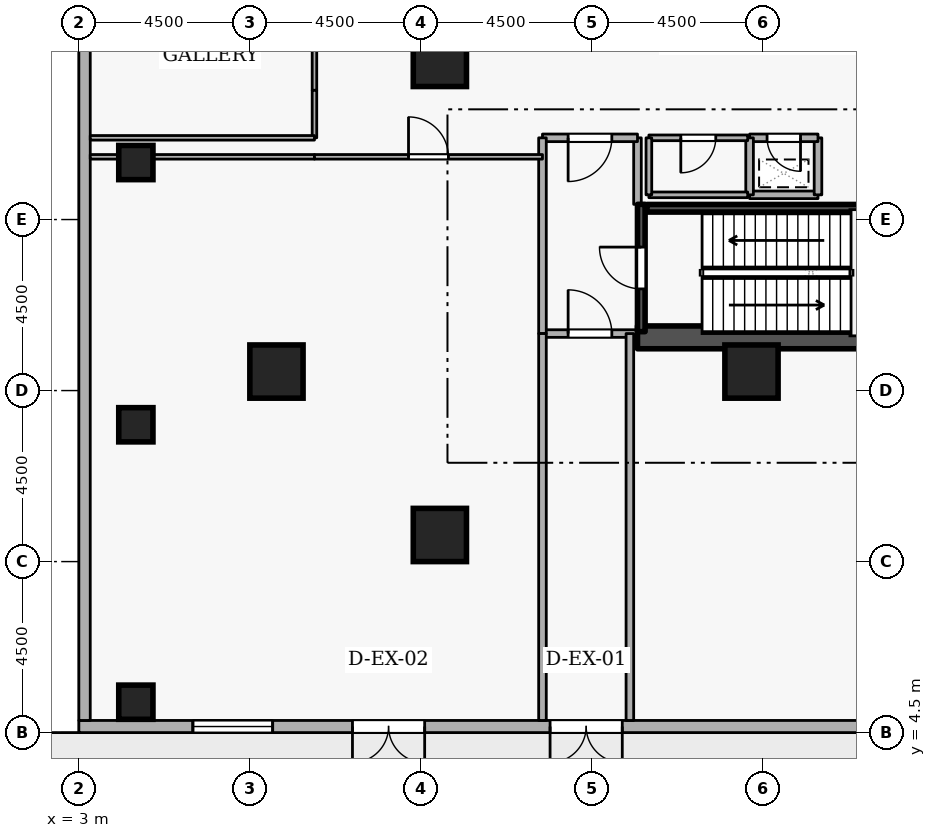
"""IFC4 building model, lengths in metres.
Left out: names, types, materials, properties, quantities, classifications, styles, units other than length and angle.
Written with IfcOpenShell. Run it as: python <this file> out.ifc"""

import sys

from ifc_helpers import new_model, si_unit, direction, frame, frame_2d, origin, origin_2d, place, context, subcontext, project, spatial, rectangle, extrude, element, fill, save


model = new_model("IFC4")
c1 = context("Model", 3, precision=1e-05, world=origin(), true_north=direction((0.0, 1.0)))
c2 = subcontext(c1, "Body", "Model", "MODEL_VIEW")
j1 = project(units=[si_unit("LENGTHUNIT", "METRE"), si_unit("PLANEANGLEUNIT", "RADIAN")], contexts=[c1])
p1 = place(None, origin())
s1 = spatial("IfcSite", under=j1, at=p1, CompositionType="ELEMENT")
p2 = place(p1, origin())
s2 = spatial("IfcBuilding", under=s1, at=p2, CompositionType="ELEMENT")
p3 = place(p2, origin())
s3 = spatial("IfcBuildingStorey", under=s2, at=p3, CompositionType="ELEMENT", Elevation=0.0)
p4 = place(p3, frame((17.7, 14.9, 0.0), z_axis=(0.0, 0.0, 1.0), x_axis=(1.0, 0.0, 0.0)))
e1 = element("IfcWall", 1, at=p4, inside=s3, PredefinedType="SHEAR", context=c2, shape_type="SweptSolid", body=[
    extrude(rectangle(XDim=15.6, YDim=0.6, at=frame_2d((7.8, 0.0))), origin(), (0.0, 0.0, 1.0), 4.8),
])
for number, where, z_axis, x_axis in (
    (2, (12.5, 9.7, 0.0), (0.0, 0.0, 1.0), (1.0, 0.0, 0.0)),
    (3, (8.2, 14.0, 0.0), (0.0, 0.0, 1.0), (1.0, 0.0, 0.0)),
    (4, (12.5, 22.2, 0.0), (0.0, 0.0, 1.0), (1.0, 0.0, 0.0)),
    (5, (20.7, 14.0, 0.0), (0.0, 0.0, 1.0), (1.0, 0.0, 0.0)),
):
    element("IfcColumn", number, at=place(p3, frame(where, z_axis=z_axis, x_axis=x_axis)), inside=s3, PredefinedType="COLUMN", context=c2, shape_type="SweptSolid", body=[
        extrude(rectangle(XDim=1.4, YDim=1.4, at=origin_2d()), origin(), (0.0, 0.0, 1.0), 4.8),
    ])
for number, where, z_axis, x_axis in (
    (6, (4.5, 5.3, 0.0), (0.0, 0.0, 1.0), (1.0, 0.0, 0.0)),
    (7, (4.5, 12.6, 0.0), (0.0, 0.0, 1.0), (1.0, 0.0, 0.0)),
    (8, (4.5, 19.5, 0.0), (0.0, 0.0, 1.0), (1.0, 0.0, 0.0)),
):
    element("IfcColumn", number, at=place(p3, frame(where, z_axis=z_axis, x_axis=x_axis)), inside=s3, PredefinedType="COLUMN", context=c2, shape_type="SweptSolid", body=[
        extrude(rectangle(XDim=0.9, YDim=0.9, at=origin_2d()), origin(), (0.0, 0.0, 1.0), 4.8),
    ])
p5 = place(p3, frame((3.0, 4.66, 0.0), z_axis=(0.0, 0.0, 1.0), x_axis=(1.0, 0.0, 0.0)))
e9 = element("IfcWall", 9, at=p5, inside=s3, PredefinedType="STANDARD", context=c2, shape_type="SweptSolid", body=[
    extrude(rectangle(XDim=39.4, YDim=0.32, at=frame_2d((19.7, 0.0))), origin(), (0.0, 0.0, 1.0), 3.86),
])
p6 = place(p5, frame((14.3, 0.0, 0.0), z_axis=(0.0, 0.0, 1.0), x_axis=(-1.0, 0.0, 0.0)))
e10 = element("IfcOpeningElement", 10, at=p6, cuts=e9, PredefinedType="OPENING", context=c2, shape_type="SweptSolid", body=[
    extrude(rectangle(XDim=1.9, YDim=2.25, at=frame_2d((0.95, 1.125))), frame((0.0, 0.17, 0.0), z_axis=(0.0, -1.0, 0.0), x_axis=(1.0, 0.0, 0.0)), (0.0, 0.0, 1.0), 0.34),
])
p7 = place(p5, frame((9.1, 0.0, 0.0), z_axis=(0.0, 0.0, 1.0), x_axis=(-1.0, 0.0, 0.0)))
e11 = element("IfcOpeningElement", 11, at=p7, cuts=e9, PredefinedType="OPENING", context=c2, shape_type="SweptSolid", body=[
    extrude(rectangle(XDim=1.9, YDim=2.25, at=frame_2d((0.95, 1.125))), frame((0.0, 0.17, 0.0), z_axis=(0.0, -1.0, 0.0), x_axis=(1.0, 0.0, 0.0)), (0.0, 0.0, 1.0), 0.34),
])
p8 = place(p5, frame((35.1, 0.0, 0.0), z_axis=(0.0, 0.0, 1.0), x_axis=(-1.0, 0.0, 0.0)))
e12 = element("IfcOpeningElement", 12, at=p8, cuts=e9, PredefinedType="OPENING", context=c2, shape_type="SweptSolid", body=[
    extrude(rectangle(XDim=1.9, YDim=2.25, at=frame_2d((0.95, 1.125))), frame((0.0, 0.17, 0.0), z_axis=(0.0, -1.0, 0.0), x_axis=(1.0, 0.0, 0.0)), (0.0, 0.0, 1.0), 0.34),
])
p9 = place(p5, frame((3.0, 0.0, 0.78)))
e13 = element("IfcOpeningElement", 13, at=p9, cuts=e9, PredefinedType="OPENING", context=c2, shape_type="SweptSolid", body=[
    extrude(rectangle(XDim=2.1, YDim=2.4, at=frame_2d((1.05, 1.2))), frame((0.0, 0.17, 0.0), z_axis=(0.0, -1.0, 0.0), x_axis=(1.0, 0.0, 0.0)), (0.0, 0.0, 1.0), 0.34),
])
p10 = place(p5, frame((22.8, 0.0, 0.78)))
e14 = element("IfcOpeningElement", 14, at=p10, cuts=e9, PredefinedType="OPENING", context=c2, shape_type="SweptSolid", body=[
    extrude(rectangle(XDim=2.1, YDim=2.4, at=frame_2d((1.05, 1.2))), frame((0.0, 0.17, 0.0), z_axis=(0.0, -1.0, 0.0), x_axis=(1.0, 0.0, 0.0)), (0.0, 0.0, 1.0), 0.34),
])
p11 = place(p3, frame((3.15, 49.18, 0.0), z_axis=(0.0, 0.0, 1.0), x_axis=(0.0, -1.0, 0.0)))
e15 = element("IfcWall", 15, at=p11, inside=s3, PredefinedType="STANDARD", context=c2, shape_type="SweptSolid", body=[
    extrude(rectangle(XDim=44.36, YDim=0.3, at=frame_2d((22.18, 0.0))), origin(), (0.0, 0.0, 1.0), 3.86),
])
p12 = place(p11, frame((22.9, 0.0, 0.0), z_axis=(0.0, 0.0, 1.0), x_axis=(-1.0, 0.0, 0.0)))
e16 = element("IfcOpeningElement", 16, at=p12, cuts=e15, PredefinedType="OPENING", context=c2, shape_type="SweptSolid", body=[
    extrude(rectangle(XDim=1.9, YDim=2.25, at=frame_2d((0.95, 1.125))), frame((0.0, 0.16, 0.0), z_axis=(0.0, -1.0, 0.0), x_axis=(1.0, 0.0, 0.0)), (0.0, 0.0, 1.0), 0.32),
])
p13 = place(p3, frame((17.8, 15.05, 0.0), z_axis=(0.0, 0.0, 1.0), x_axis=(0.0, 1.0, 0.0)))
e17 = element("IfcWall", 17, at=p13, inside=s3, PredefinedType="SHEAR", context=c2, shape_type="SweptSolid", body=[
    extrude(rectangle(XDim=3.35, YDim=0.2, at=frame_2d((1.675, 0.0))), origin(), (0.0, 0.0, 1.0), 4.8),
])
p14 = place(p13, frame((1.125, 0.0, 0.0)))
e18 = element("IfcOpeningElement", 18, at=p14, cuts=e17, PredefinedType="OPENING", context=c2, shape_type="SweptSolid", body=[
    extrude(rectangle(XDim=1.1, YDim=2.1, at=frame_2d((0.55, 1.05))), frame((0.0, 0.11, 0.0), z_axis=(0.0, -1.0, 0.0), x_axis=(1.0, 0.0, 0.0)), (0.0, 0.0, 1.0), 0.22),
])
p15 = place(p3, frame((25.05, 18.297, 0.0), z_axis=(0.0, 0.0, 1.0), x_axis=(-1.0, 0.0, 0.0)))
e19 = element("IfcWall", 19, at=p15, inside=s3, PredefinedType="SHEAR", context=c2, shape_type="SweptSolid", body=[
    extrude(rectangle(XDim=7.1, YDim=0.2, at=frame_2d((3.55, 0.0))), origin(), (0.0, 0.0, 1.0), 4.8),
])
p16 = place(p3, frame((15.2, 15.0, 0.0), z_axis=(0.0, 0.0, 1.0), x_axis=(1.0, 0.0, 0.0)))
e20 = element("IfcWall", 20, at=p16, inside=s3, PredefinedType="STANDARD", context=c2, shape_type="SweptSolid", body=[
    extrude(rectangle(XDim=2.5, YDim=0.2, at=frame_2d((1.25, 0.0))), origin(), (0.0, 0.0, 1.0), 4.46),
])
p17 = place(p16, frame((0.675, 0.0, 0.0)))
e21 = element("IfcOpeningElement", 21, at=p17, cuts=e20, PredefinedType="OPENING", context=c2, shape_type="SweptSolid", body=[
    extrude(rectangle(XDim=1.15, YDim=2.1, at=frame_2d((0.575, 1.05))), frame((0.0, 0.11, 0.0), z_axis=(0.0, -1.0, 0.0), x_axis=(1.0, 0.0, 0.0)), (0.0, 0.0, 1.0), 0.22),
])
p18 = place(p3, frame((17.7, 18.4, 0.0), z_axis=(0.0, 0.0, 1.0), x_axis=(0.0, 1.0, 0.0)))
e22 = element("IfcWall", 22, at=p18, inside=s3, PredefinedType="STANDARD", context=c2, shape_type="SweptSolid", body=[
    extrude(rectangle(XDim=1.75, YDim=0.2, at=frame_2d((0.875, 0.0))), origin(), (0.0, 0.0, 1.0), 3.665),
])
p19 = place(p3, frame((17.7, 20.15, 0.0), z_axis=(0.0, 0.0, 1.0), x_axis=(-1.0, 0.0, 0.0)))
e23 = element("IfcWall", 23, at=p19, inside=s3, PredefinedType="STANDARD", context=c2, shape_type="SweptSolid", body=[
    extrude(rectangle(XDim=2.5, YDim=0.2, at=frame_2d((1.25, 0.0))), origin(), (0.0, 0.0, 1.0), 4.46),
])
p20 = place(p19, frame((0.675, 0.0, 0.0)))
e24 = element("IfcOpeningElement", 24, at=p20, cuts=e23, PredefinedType="OPENING", context=c2, shape_type="SweptSolid", body=[
    extrude(rectangle(XDim=1.15, YDim=2.1, at=frame_2d((0.575, 1.05))), frame((0.0, 0.11, 0.0), z_axis=(0.0, -1.0, 0.0), x_axis=(1.0, 0.0, 0.0)), (0.0, 0.0, 1.0), 0.22),
])
p21 = place(p3, frame((15.2, 20.15, 0.0), z_axis=(0.0, 0.0, 1.0), x_axis=(0.0, -1.0, 0.0)))
e25 = element("IfcWall", 25, at=p21, inside=s3, PredefinedType="STANDARD", context=c2, shape_type="SweptSolid", body=[
    extrude(rectangle(XDim=5.15, YDim=0.2, at=frame_2d((2.575, 0.0))), origin(), (0.0, 0.0, 1.0), 4.46),
])
p22 = place(p3, frame((20.65, 18.65, 0.0), z_axis=(0.0, 0.0, 1.0), x_axis=(1.0, 0.0, 0.0)))
e26 = element("IfcWall", 26, at=p22, inside=s3, PredefinedType="STANDARD", context=c2, shape_type="SweptSolid", body=[
    extrude(rectangle(XDim=1.8, YDim=0.2, at=frame_2d((0.9, 0.0))), origin(), (0.0, 0.0, 1.0), 4.46),
])
p23 = place(p3, frame((22.45, 18.65, 0.0), z_axis=(0.0, 0.0, 1.0), x_axis=(0.0, 1.0, 0.0)))
e27 = element("IfcWall", 27, at=p23, inside=s3, PredefinedType="STANDARD", context=c2, shape_type="SweptSolid", body=[
    extrude(rectangle(XDim=1.5, YDim=0.2, at=frame_2d((0.75, 0.0))), origin(), (0.0, 0.0, 1.0), 4.46),
])
p24 = place(p3, frame((22.45, 20.15, 0.0), z_axis=(0.0, 0.0, 1.0), x_axis=(-1.0, 0.0, 0.0)))
e28 = element("IfcWall", 28, at=p24, inside=s3, PredefinedType="STANDARD", context=c2, shape_type="SweptSolid", body=[
    extrude(rectangle(XDim=1.8, YDim=0.2, at=frame_2d((0.9, 0.0))), origin(), (0.0, 0.0, 1.0), 4.46),
])
p25 = place(p24, frame((0.46, 0.0, 0.0)))
e29 = element("IfcOpeningElement", 29, at=p25, cuts=e28, PredefinedType="OPENING", context=c2, shape_type="SweptSolid", body=[
    extrude(rectangle(XDim=0.88, YDim=2.04, at=frame_2d((0.44, 1.02))), frame((0.0, 0.11, 0.0), z_axis=(0.0, -1.0, 0.0), x_axis=(1.0, 0.0, 0.0)), (0.0, 0.0, 1.0), 0.22),
])
p26 = place(p3, frame((20.65, 20.15, 0.0), z_axis=(0.0, 0.0, 1.0), x_axis=(0.0, -1.0, 0.0)))
e30 = element("IfcWall", 30, at=p26, inside=s3, PredefinedType="STANDARD", context=c2, shape_type="SweptSolid", body=[
    extrude(rectangle(XDim=1.5, YDim=0.2, at=frame_2d((0.75, 0.0))), origin(), (0.0, 0.0, 1.0), 4.46),
])
for number, where, z_axis, x_axis in (
    (31, (15.2, 4.82, 0.0), (0.0, 0.0, 1.0), (0.0, 1.0, 0.0)),
    (32, (17.5, 15.0, 0.0), (0.0, 0.0, 1.0), (0.0, -1.0, 0.0)),
):
    element("IfcWall", number, at=place(p3, frame(where, z_axis=z_axis, x_axis=x_axis)), inside=s3, PredefinedType="STANDARD", context=c2, shape_type="SweptSolid", body=[
        extrude(rectangle(XDim=10.18, YDim=0.2, at=frame_2d((5.09, 0.0))), origin(), (0.0, 0.0, 1.0), 4.46),
    ])
p27 = place(p3, frame((18.0, 18.65, 0.0), z_axis=(0.0, 0.0, 1.0), x_axis=(1.0, 0.0, 0.0)))
e33 = element("IfcWall", 33, at=p27, inside=s3, PredefinedType="PARTITIONING", context=c2, shape_type="SweptSolid", body=[
    extrude(rectangle(XDim=2.6, YDim=0.15, at=frame_2d((1.3, 0.0))), origin(), (0.0, 0.0, 1.0), 4.46),
])
p28 = place(p3, frame((20.6, 20.15, 0.0), z_axis=(0.0, 0.0, 1.0), x_axis=(-1.0, 0.0, 0.0)))
e34 = element("IfcWall", 34, at=p28, inside=s3, PredefinedType="PARTITIONING", context=c2, shape_type="SweptSolid", body=[
    extrude(rectangle(XDim=2.6, YDim=0.15, at=frame_2d((1.3, 0.0))), origin(), (0.0, 0.0, 1.0), 4.46),
])
p29 = place(p28, frame((0.84, 0.0, 0.0)))
e35 = element("IfcOpeningElement", 35, at=p29, cuts=e34, PredefinedType="OPENING", context=c2, shape_type="SweptSolid", body=[
    extrude(rectangle(XDim=0.92, YDim=2.08, at=frame_2d((0.46, 1.04))), frame((0.0, 0.085, 0.0), z_axis=(0.0, -1.0, 0.0), x_axis=(1.0, 0.0, 0.0)), (0.0, 0.0, 1.0), 0.17),
])
p30 = place(p3, frame((18.0, 20.15, 0.0), z_axis=(0.0, 0.0, 1.0), x_axis=(0.0, -1.0, 0.0)))
e36 = element("IfcWall", 36, at=p30, inside=s3, PredefinedType="PARTITIONING", context=c2, shape_type="SweptSolid", body=[
    extrude(rectangle(XDim=1.5, YDim=0.15, at=frame_2d((0.75, 0.0))), origin(), (0.0, 0.0, 1.0), 3.665),
])
p31 = place(p3, frame((3.3, 19.65, 0.0), z_axis=(0.0, 0.0, 1.0), x_axis=(1.0, 0.0, 0.0)))
e37 = element("IfcWall", 37, at=p31, inside=s3, PredefinedType="PARTITIONING", context=c2, shape_type="SweptSolid", body=[
    extrude(rectangle(XDim=5.9, YDim=0.12, at=frame_2d((2.95, 0.0))), origin(), (0.0, 0.0, 1.0), 4.46),
])
p32 = place(p3, frame((9.2, 19.65, 0.0), z_axis=(0.0, 0.0, 1.0), x_axis=(1.0, 0.0, 0.0)))
e38 = element("IfcWall", 38, at=p32, inside=s3, PredefinedType="PARTITIONING", context=c2, shape_type="SweptSolid", body=[
    extrude(rectangle(XDim=6.0, YDim=0.12, at=frame_2d((3.0, 0.0))), origin(), (0.0, 0.0, 1.0), 4.46),
])
p33 = place(p32, frame((2.475, 0.0, 0.0)))
e39 = element("IfcOpeningElement", 39, at=p33, cuts=e38, PredefinedType="OPENING", context=c2, shape_type="SweptSolid", body=[
    extrude(rectangle(XDim=1.05, YDim=2.1, at=frame_2d((0.525, 1.05))), frame((0.0, 0.07, 0.0), z_axis=(0.0, -1.0, 0.0), x_axis=(1.0, 0.0, 0.0)), (0.0, 0.0, 1.0), 0.14),
])
p34 = place(p3, frame((9.2, 33.85, 0.0), z_axis=(0.0, 0.0, 1.0), x_axis=(0.0, -1.0, 0.0)))
e40 = element("IfcWall", 40, at=p34, inside=s3, PredefinedType="PARTITIONING", context=c2, shape_type="SweptSolid", body=[
    extrude(rectangle(XDim=12.45, YDim=0.12, at=frame_2d((6.225, 0.0))), origin(), (0.0, 0.0, 1.0), 4.46),
])
p35 = place(p34, frame((4.82, 0.0, 0.0)))
e41 = element("IfcOpeningElement", 41, at=p35, cuts=e40, PredefinedType="OPENING", context=c2, shape_type="SweptSolid", body=[
    extrude(rectangle(XDim=1.05, YDim=2.1, at=frame_2d((0.525, 1.05))), frame((0.0, 0.07, 0.0), z_axis=(0.0, -1.0, 0.0), x_axis=(1.0, 0.0, 0.0)), (0.0, 0.0, 1.0), 0.14),
])
p36 = place(p3, frame((9.2, 21.4, 0.0), z_axis=(0.0, 0.0, 1.0), x_axis=(0.0, -1.0, 0.0)))
e42 = element("IfcWall", 42, at=p36, inside=s3, PredefinedType="PARTITIONING", context=c2, shape_type="SweptSolid", body=[
    extrude(rectangle(XDim=1.25, YDim=0.12, at=frame_2d((0.625, 0.0))), origin(), (0.0, 0.0, 1.0), 4.46),
])
p37 = place(p3, frame((9.2, 20.15, 0.0), z_axis=(0.0, 0.0, 1.0), x_axis=(-1.0, 0.0, 0.0)))
e43 = element("IfcWall", 43, at=p37, inside=s3, PredefinedType="PARTITIONING", context=c2, shape_type="SweptSolid", body=[
    extrude(rectangle(XDim=5.9, YDim=0.12, at=frame_2d((2.95, 0.0))), origin(), (0.0, 0.0, 1.0), 4.46),
])
p38 = place(p6, origin())
e44 = element("IfcDoor", 44, at=p38, inside=s3, OperationType="DOUBLE_DOOR_SINGLE_SWING", PredefinedType="DOOR", context=c2, shape_type="SweptSolid", body=[
    extrude(rectangle(XDim=1.9, YDim=2.25, at=frame_2d((0.95, 1.125))), frame((0.0, 0.025, 0.0), z_axis=(0.0, -1.0, 0.0), x_axis=(1.0, 0.0, 0.0)), (0.0, 0.0, 1.0), 0.05),
])
fill(e10, e44)
p39 = place(p7, origin())
e45 = element("IfcDoor", 45, at=p39, inside=s3, OperationType="DOUBLE_DOOR_SINGLE_SWING", PredefinedType="DOOR", context=c2, shape_type="SweptSolid", body=[
    extrude(rectangle(XDim=1.9, YDim=2.25, at=frame_2d((0.95, 1.125))), frame((0.0, 0.025, 0.0), z_axis=(0.0, -1.0, 0.0), x_axis=(1.0, 0.0, 0.0)), (0.0, 0.0, 1.0), 0.05),
])
fill(e11, e45)
p40 = place(p9, origin())
e46 = element("IfcWindow", 46, at=p40, inside=s3, PartitioningType="SINGLE_PANEL", PredefinedType="WINDOW", context=c2, shape_type="SweptSolid", body=[
    extrude(rectangle(XDim=2.1, YDim=2.4, at=frame_2d((1.05, 1.2))), frame((0.0, 0.03, 0.0), z_axis=(0.0, -1.0, 0.0), x_axis=(1.0, 0.0, 0.0)), (0.0, 0.0, 1.0), 0.06),
])
fill(e13, e46)
p41 = place(p14, origin())
e47 = element("IfcDoor", 47, at=p41, inside=s3, OperationType="SINGLE_SWING_RIGHT", PredefinedType="DOOR", context=c2, shape_type="SweptSolid", body=[
    extrude(rectangle(XDim=1.1, YDim=2.1, at=frame_2d((0.55, 1.05))), frame((0.0, 0.025, 0.0), z_axis=(0.0, -1.0, 0.0), x_axis=(1.0, 0.0, 0.0)), (0.0, 0.0, 1.0), 0.05),
])
fill(e18, e47)
p42 = place(p20, origin())
e48 = element("IfcDoor", 48, at=p42, inside=s3, OperationType="SINGLE_SWING_RIGHT", PredefinedType="DOOR", context=c2, shape_type="SweptSolid", body=[
    extrude(rectangle(XDim=1.15, YDim=2.1, at=frame_2d((0.575, 1.05))), frame((0.0, 0.025, 0.0), z_axis=(0.0, -1.0, 0.0), x_axis=(1.0, 0.0, 0.0)), (0.0, 0.0, 1.0), 0.05),
])
fill(e24, e48)
p43 = place(p25, origin())
e49 = element("IfcDoor", 49, at=p43, inside=s3, OperationType="SINGLE_SWING_LEFT", PredefinedType="DOOR", context=c2, shape_type="SweptSolid", body=[
    extrude(rectangle(XDim=0.88, YDim=2.04, at=frame_2d((0.44, 1.02))), frame((0.0, 0.025, 0.0), z_axis=(0.0, -1.0, 0.0), x_axis=(1.0, 0.0, 0.0)), (0.0, 0.0, 1.0), 0.05),
])
fill(e29, e49)
p44 = place(p29, origin())
e50 = element("IfcDoor", 50, at=p44, inside=s3, OperationType="SINGLE_SWING_RIGHT", PredefinedType="DOOR", context=c2, shape_type="SweptSolid", body=[
    extrude(rectangle(XDim=0.92, YDim=2.08, at=frame_2d((0.46, 1.04))), frame((0.0, 0.025, 0.0), z_axis=(0.0, -1.0, 0.0), x_axis=(1.0, 0.0, 0.0)), (0.0, 0.0, 1.0), 0.05),
])
fill(e35, e50)
p45 = place(p17, origin())
e51 = element("IfcDoor", 51, at=p45, inside=s3, OperationType="SINGLE_SWING_LEFT", PredefinedType="DOOR", context=c2, shape_type="SweptSolid", body=[
    extrude(rectangle(XDim=1.15, YDim=2.1, at=frame_2d((0.575, 1.05))), frame((0.0, 0.025, 0.0), z_axis=(0.0, -1.0, 0.0), x_axis=(1.0, 0.0, 0.0)), (0.0, 0.0, 1.0), 0.05),
])
fill(e21, e51)
p46 = place(p33, origin())
e52 = element("IfcDoor", 52, at=p46, inside=s3, OperationType="SINGLE_SWING_LEFT", PredefinedType="DOOR", context=c2, shape_type="SweptSolid", body=[
    extrude(rectangle(XDim=1.05, YDim=2.1, at=frame_2d((0.525, 1.05))), frame((0.0, 0.025, 0.0), z_axis=(0.0, -1.0, 0.0), x_axis=(1.0, 0.0, 0.0)), (0.0, 0.0, 1.0), 0.05),
])
fill(e39, e52)
save(model, sys.argv[1])
